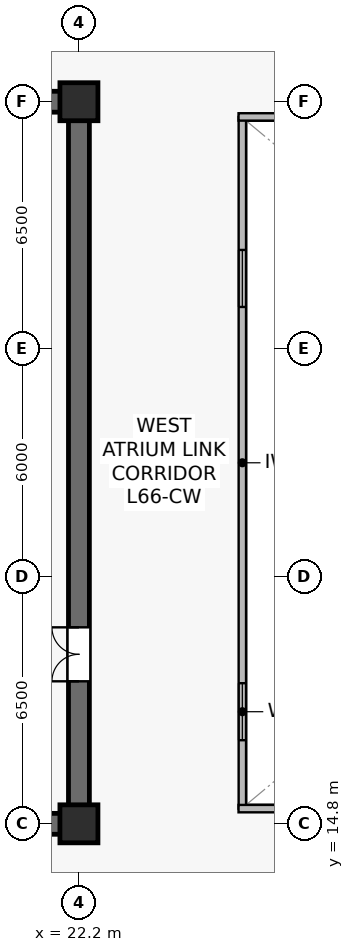
"""IFC4 building model, lengths in metres.
Left out: names, types, materials, properties, quantities, classifications, styles, units other than length and angle.
Written with IfcOpenShell. Run it as: python <this file> out.ifc"""

import sys

from ifc_helpers import new_model, si_unit, direction, frame, frame_2d, origin, origin_2d, place, context, subcontext, project, spatial, rectangle, extrude, source, transform, mapped, element, fill, save


model = new_model("IFC4")
c1 = context("Model", 3, precision=1e-05, world=origin(), true_north=direction((0.0, 1.0)))
c2 = subcontext(c1, "Body", "Model", "MODEL_VIEW")
j1 = project(units=[si_unit("LENGTHUNIT", "METRE"), si_unit("PLANEANGLEUNIT", "RADIAN")], contexts=[c1])
p1 = place(None, origin())
s1 = spatial("IfcSite", under=j1, at=p1, CompositionType="ELEMENT")
p2 = place(p1, origin())
s2 = spatial("IfcBuilding", under=s1, at=p2, CompositionType="ELEMENT")
p3 = place(p2, frame((0.0, 0.0, 275.2)))
s3 = spatial("IfcBuildingStorey", under=s2, at=p3, CompositionType="ELEMENT", Elevation=275.2)
p4 = place(p3, frame((7.125, 14.8, 0.0), z_axis=(0.0, 0.0, 1.0), x_axis=(1.0, 0.0, 0.0)))
e1 = element("IfcWall", 1, at=p4, inside=s3, PredefinedType="SHEAR", context=c2, shape_type="SweptSolid", body=[
    extrude(rectangle(XDim=15.35, YDim=0.55, at=frame_2d((7.675, 0.0))), origin(), (0.0, 0.0, 1.0), 3.8),
])
p5 = place(p3, frame((7.125, 33.8, 0.0), z_axis=(0.0, 0.0, 1.0), x_axis=(1.0, 0.0, 0.0)))
e2 = element("IfcWall", 2, at=p5, inside=s3, PredefinedType="SHEAR", context=c2, shape_type="SweptSolid", body=[
    extrude(rectangle(XDim=15.35, YDim=0.55, at=frame_2d((7.675, 0.0))), origin(), (0.0, 0.0, 1.0), 3.8),
])
p6 = place(p5, frame((5.2, 0.0, 0.0)))
e3 = element("IfcOpeningElement", 3, at=p6, cuts=e2, PredefinedType="OPENING", context=c2, shape_type="SweptSolid", body=[
    extrude(rectangle(XDim=0.95, YDim=2.15, at=frame_2d((0.475, 1.075))), frame((0.0, 0.285, 0.0), z_axis=(0.0, -1.0, 0.0), x_axis=(1.0, 0.0, 0.0)), (0.0, 0.0, 1.0), 0.57),
])
p7 = place(p5, frame((7.715, 0.0, 0.0)))
e4 = element("IfcOpeningElement", 4, at=p7, cuts=e2, PredefinedType="OPENING", context=c2, shape_type="SweptSolid", body=[
    extrude(rectangle(XDim=0.95, YDim=2.15, at=frame_2d((0.475, 1.075))), frame((0.0, 0.285, 0.0), z_axis=(0.0, -1.0, 0.0), x_axis=(1.0, 0.0, 0.0)), (0.0, 0.0, 1.0), 0.57),
])
p8 = place(p5, frame((10.265, 0.0, 0.0)))
e5 = element("IfcOpeningElement", 5, at=p8, cuts=e2, PredefinedType="OPENING", context=c2, shape_type="SweptSolid", body=[
    extrude(rectangle(XDim=0.95, YDim=2.15, at=frame_2d((0.475, 1.075))), frame((0.0, 0.285, 0.0), z_axis=(0.0, -1.0, 0.0), x_axis=(1.0, 0.0, 0.0)), (0.0, 0.0, 1.0), 0.57),
])
p9 = place(p5, frame((12.815, 0.0, 0.0)))
e6 = element("IfcOpeningElement", 6, at=p9, cuts=e2, PredefinedType="OPENING", context=c2, shape_type="SweptSolid", body=[
    extrude(rectangle(XDim=0.95, YDim=2.15, at=frame_2d((0.475, 1.075))), frame((0.0, 0.285, 0.0), z_axis=(0.0, -1.0, 0.0), x_axis=(1.0, 0.0, 0.0)), (0.0, 0.0, 1.0), 0.57),
])
p10 = place(p3, frame((22.2, 15.075, 0.0), z_axis=(0.0, 0.0, 1.0), x_axis=(0.0, 1.0, 0.0)))
e7 = element("IfcWall", 7, at=p10, inside=s3, PredefinedType="SHEAR", context=c2, shape_type="SweptSolid", body=[
    extrude(rectangle(XDim=18.45, YDim=0.55, at=frame_2d((9.225, 0.0))), origin(), (0.0, 0.0, 1.0), 3.8),
])
p11 = place(p10, frame((3.475, 0.0, 0.0)))
e8 = element("IfcOpeningElement", 8, at=p11, cuts=e7, PredefinedType="OPENING", context=c2, shape_type="SweptSolid", body=[
    extrude(rectangle(XDim=1.42, YDim=2.2, at=frame_2d((0.71, 1.1))), frame((0.0, 0.285, 0.0), z_axis=(0.0, -1.0, 0.0), x_axis=(1.0, 0.0, 0.0)), (0.0, 0.0, 1.0), 0.57),
])
m1 = source(origin(), c2, "Body", "SweptSolid", [
    extrude(rectangle(XDim=1.0, YDim=1.0, at=origin_2d()), origin(), (0.0, 0.0, 1.0), 4.1),
])
for number, where, z_axis, x_axis in (
    (9, (22.2, 14.8, 0.0), (0.0, 0.0, 1.0), (1.0, 0.0, 0.0)),
    (10, (22.2, 33.8, 0.0), (0.0, 0.0, 1.0), (1.0, 0.0, 0.0)),
):
    element("IfcColumn", number, at=place(p3, frame(where, z_axis=z_axis, x_axis=x_axis)), inside=s3, PredefinedType="COLUMN", context=c2, shape_type="MappedRepresentation", body=[
        mapped(m1, transform((0.0, 0.0, 0.0), scale=1.0)),
    ])
p12 = place(p3, frame((26.5, 15.2, 0.0), z_axis=(0.0, 0.0, 1.0), x_axis=(0.0, 1.0, 0.0)))
e11 = element("IfcWall", 11, at=p12, inside=s3, PredefinedType="SOLIDWALL", context=c2, shape_type="SweptSolid", body=[
    extrude(rectangle(XDim=18.2, YDim=0.195, at=frame_2d((9.1, 0.0))), origin(), (0.0, 0.0, 1.0), 3.8),
])
p13 = place(p12, frame((1.8, 0.0, 0.9)))
e12 = element("IfcOpeningElement", 12, at=p13, cuts=e11, PredefinedType="OPENING", context=c2, shape_type="SweptSolid", body=[
    extrude(rectangle(XDim=1.5, YDim=1.4, at=frame_2d((0.75, 0.7))), frame((0.0, 0.107, 0.0), z_axis=(0.0, -1.0, 0.0), x_axis=(1.0, 0.0, 0.0)), (0.0, 0.0, 1.0), 0.215),
])
p14 = place(p12, frame((13.2, 0.0, 0.9)))
e13 = element("IfcOpeningElement", 13, at=p14, cuts=e11, PredefinedType="OPENING", context=c2, shape_type="SweptSolid", body=[
    extrude(rectangle(XDim=1.5, YDim=1.4, at=frame_2d((0.75, 0.7))), frame((0.0, 0.107, 0.0), z_axis=(0.0, -1.0, 0.0), x_axis=(1.0, 0.0, 0.0)), (0.0, 0.0, 1.0), 0.215),
])
for number, where, z_axis, x_axis in (
    (14, (26.4, 15.2, 0.0), (0.0, 0.0, 1.0), (1.0, 0.0, 0.0)),
    (15, (26.4, 33.4, 0.0), (0.0, 0.0, 1.0), (1.0, 0.0, 0.0)),
):
    element("IfcWall", number, at=place(p3, frame(where, z_axis=z_axis, x_axis=x_axis)), inside=s3, PredefinedType="SOLIDWALL", context=c2, shape_type="SweptSolid", body=[
        extrude(rectangle(XDim=22.0, YDim=0.195, at=frame_2d((11.0, 0.0))), origin(), (0.0, 0.0, 1.0), 3.8),
    ])
m2 = source(origin(), c2, "Body", "SweptSolid", [
    extrude(rectangle(XDim=1.5, YDim=1.4, at=frame_2d((0.75, 0.7))), frame((0.0, 0.03, 0.0), z_axis=(0.0, -1.0, 0.0), x_axis=(1.0, 0.0, 0.0)), (0.0, 0.0, 1.0), 0.06),
])
p15 = place(p13, origin())
e16 = element("IfcWindow", 16, at=p15, inside=s3, PartitioningType="SINGLE_PANEL", PredefinedType="WINDOW", context=c2, shape_type="MappedRepresentation", body=[
    mapped(m2, transform((0.0, 0.0, 0.0), scale=1.0)),
])
fill(e12, e16)
p16 = place(p14, origin())
e17 = element("IfcWindow", 17, at=p16, inside=s3, PartitioningType="SINGLE_PANEL", PredefinedType="WINDOW", context=c2, shape_type="MappedRepresentation", body=[
    mapped(m2, transform((0.0, 0.0, 0.0), scale=1.0)),
])
fill(e13, e17)
m3 = source(origin(), c2, "Body", "SweptSolid", [
    extrude(rectangle(XDim=1.42, YDim=2.2, at=frame_2d((0.71, 1.1))), frame((0.0, 0.025, 0.0), z_axis=(0.0, -1.0, 0.0), x_axis=(1.0, 0.0, 0.0)), (0.0, 0.0, 1.0), 0.05),
])
p17 = place(p11, origin())
e18 = element("IfcDoor", 18, at=p17, inside=s3, OperationType="DOUBLE_DOOR_SINGLE_SWING", PredefinedType="DOOR", context=c2, shape_type="MappedRepresentation", body=[
    mapped(m3, transform((0.0, 0.0, 0.0), scale=1.0)),
])
fill(e8, e18)
save(model, sys.argv[1])
